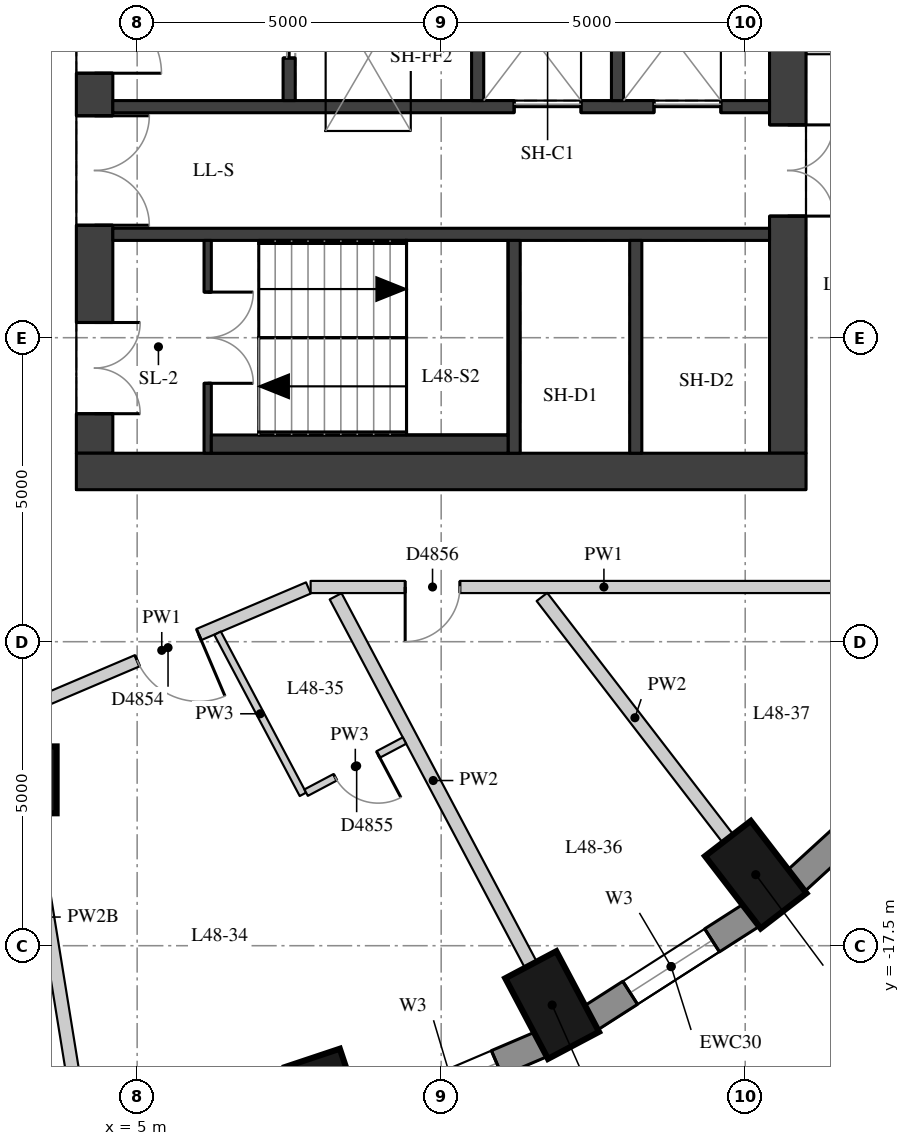
"""IFC4 building model, lengths in metres.
Left out: names, types, materials, properties, quantities, classifications, styles, units other than length and angle.
Written with IfcOpenShell. Run it as: python <this file> out.ifc"""

import sys

from ifc_helpers import new_model, si_unit, direction, frame, frame_2d, origin, origin_2d, place, context, subcontext, project, spatial, rectangle, extrude, element, fill, save


model = new_model("IFC4")
c1 = context("Model", 3, precision=1e-05, world=origin(), true_north=direction((0.0, 1.0)))
c2 = subcontext(c1, "Body", "Model", "MODEL_VIEW")
j1 = project(units=[si_unit("LENGTHUNIT", "METRE"), si_unit("PLANEANGLEUNIT", "RADIAN")], contexts=[c1])
p1 = place(None, origin())
s1 = spatial("IfcSite", under=j1, at=p1, CompositionType="ELEMENT")
p2 = place(p1, origin())
s2 = spatial("IfcBuilding", under=s1, at=p2, CompositionType="ELEMENT")
p3 = place(p2, frame((0.0, 0.0, 171.5)))
s3 = spatial("IfcBuildingStorey", under=s2, at=p3, CompositionType="ELEMENT", Elevation=171.5)
for number, where, z_axis, x_axis in (
    (1, (8.12, -20.056, 0.0), (0.0, 0.0, 1.0), (0.317, -0.949, 0.0)),
    (2, (11.825, -18.476, 0.0), (0.0, 0.0, 1.0), (0.468, -0.884, 0.0)),
    (3, (15.173, -16.332, 0.0), (0.0, 0.0, 1.0), (0.61, -0.792, 0.0)),
):
    element("IfcColumn", number, at=place(p3, frame(where, z_axis=z_axis, x_axis=x_axis)), inside=s3, PredefinedType="COLUMN", context=c2, shape_type="SweptSolid", body=[
        extrude(rectangle(XDim=1.5, YDim=0.95, at=origin_2d()), origin(), (0.0, 0.0, 1.0), 3.3),
    ])
p4 = place(p3, frame((3.126, -14.772, 0.0), z_axis=(0.0, 0.0, 1.0), x_axis=(1.0, 0.0, 0.0)))
e4 = element("IfcColumn", 4, at=p4, inside=s3, PredefinedType="COLUMN", context=c2, shape_type="SweptSolid", body=[
    extrude(rectangle(XDim=1.1, YDim=1.1, at=origin_2d()), origin(), (0.0, 0.0, 1.0), 3.3),
])
p5 = place(p3, frame((8.706, -20.375, 0.0), z_axis=(0.0, 0.0, 1.0), x_axis=(0.91981046949, 0.392362969986, 0.0)))
e5 = element("IfcWall", 5, at=p5, inside=s3, PredefinedType="SOLIDWALL", context=c2, shape_type="SweptSolid", body=[
    extrude(rectangle(XDim=3.201, YDim=0.45, at=frame_2d((1.6, 0.0))), origin(), (0.0, 0.0, 1.0), 3.02),
])
p6 = place(p5, frame((0.8, 0.0, 0.4)))
e6 = element("IfcOpeningElement", 6, at=p6, cuts=e5, PredefinedType="OPENING", context=c2, shape_type="SweptSolid", body=[
    extrude(rectangle(XDim=1.6, YDim=1.75, at=frame_2d((0.8, 0.875))), frame((0.0, 0.235, 0.0), z_axis=(0.0, -1.0, 0.0), x_axis=(1.0, 0.0, 0.0)), (0.0, 0.0, 1.0), 0.47),
])
p7 = place(p3, frame((12.455, -18.693, 0.0), z_axis=(0.0, 0.0, 1.0), x_axis=(0.842065914439, 0.539374633943, 0.0)))
e7 = element("IfcWall", 7, at=p7, inside=s3, PredefinedType="SOLIDWALL", context=c2, shape_type="SweptSolid", body=[
    extrude(rectangle(XDim=3.151, YDim=0.45, at=frame_2d((1.576, 0.0))), origin(), (0.0, 0.0, 1.0), 3.02),
])
p8 = place(p7, frame((0.776, 0.0, 0.4)))
e8 = element("IfcOpeningElement", 8, at=p8, cuts=e7, PredefinedType="OPENING", context=c2, shape_type="SweptSolid", body=[
    extrude(rectangle(XDim=1.6, YDim=1.75, at=frame_2d((0.8, 0.875))), frame((0.0, 0.235, 0.0), z_axis=(0.0, -1.0, 0.0), x_axis=(1.0, 0.0, 0.0)), (0.0, 0.0, 1.0), 0.47),
])
p9 = place(p3, frame((15.83, -16.439, 0.0), z_axis=(0.0, 0.0, 1.0), x_axis=(0.737808755941, 0.675009807082, 0.0)))
e9 = element("IfcWall", 9, at=p9, inside=s3, PredefinedType="SOLIDWALL", context=c2, shape_type="SweptSolid", body=[
    extrude(rectangle(XDim=3.094, YDim=0.45, at=frame_2d((1.547, 0.0))), origin(), (0.0, 0.0, 1.0), 3.02),
])
p10 = place(p3, frame((4.3, -9.4, 0.0), z_axis=(0.0, 0.0, 1.0), x_axis=(0.0, 1.0, 0.0)))
e10 = element("IfcWall", 10, at=p10, inside=s3, PredefinedType="SHEAR", context=c2, shape_type="SweptSolid", body=[
    extrude(rectangle(XDim=18.8, YDim=0.6, at=frame_2d((9.4, 0.0))), origin(), (0.0, 0.0, 1.0), 3.02),
])
p11 = place(p10, frame((0.65, 0.0, 0.0)))
e11 = element("IfcOpeningElement", 11, at=p11, cuts=e10, PredefinedType="OPENING", context=c2, shape_type="SweptSolid", body=[
    extrude(rectangle(XDim=1.5, YDim=2.1, at=frame_2d((0.75, 1.05))), frame((0.0, 0.31, 0.0), z_axis=(0.0, -1.0, 0.0), x_axis=(1.0, 0.0, 0.0)), (0.0, 0.0, 1.0), 0.62),
])
p12 = place(p10, frame((3.75, 0.0, 0.0)))
e12 = element("IfcOpeningElement", 12, at=p12, cuts=e10, PredefinedType="OPENING", context=c2, shape_type="SweptSolid", body=[
    extrude(rectangle(XDim=1.8, YDim=2.1, at=frame_2d((0.9, 1.05))), frame((0.0, 0.31, 0.0), z_axis=(0.0, -1.0, 0.0), x_axis=(1.0, 0.0, 0.0)), (0.0, 0.0, 1.0), 0.62),
])
p13 = place(p10, frame((6.25, 0.0, 0.0)))
e13 = element("IfcOpeningElement", 13, at=p13, cuts=e10, PredefinedType="OPENING", context=c2, shape_type="SweptSolid", body=[
    extrude(rectangle(XDim=1.1, YDim=2.1, at=frame_2d((0.55, 1.05))), frame((0.0, 0.31, 0.0), z_axis=(0.0, -1.0, 0.0), x_axis=(1.0, 0.0, 0.0)), (0.0, 0.0, 1.0), 0.62),
])
p14 = place(p10, frame((8.9, 0.0, 0.0)))
e14 = element("IfcOpeningElement", 14, at=p14, cuts=e10, PredefinedType="OPENING", context=c2, shape_type="SweptSolid", body=[
    extrude(rectangle(XDim=1.0, YDim=2.1, at=frame_2d((0.5, 1.05))), frame((0.0, 0.31, 0.0), z_axis=(0.0, -1.0, 0.0), x_axis=(1.0, 0.0, 0.0)), (0.0, 0.0, 1.0), 0.62),
])
p15 = place(p10, frame((11.45, 0.0, 0.0)))
e15 = element("IfcOpeningElement", 15, at=p15, cuts=e10, PredefinedType="OPENING", context=c2, shape_type="SweptSolid", body=[
    extrude(rectangle(XDim=1.1, YDim=2.1, at=frame_2d((0.55, 1.05))), frame((0.0, 0.31, 0.0), z_axis=(0.0, -1.0, 0.0), x_axis=(1.0, 0.0, 0.0)), (0.0, 0.0, 1.0), 0.62),
])
p16 = place(p10, frame((13.25, 0.0, 0.0)))
e16 = element("IfcOpeningElement", 16, at=p16, cuts=e10, PredefinedType="OPENING", context=c2, shape_type="SweptSolid", body=[
    extrude(rectangle(XDim=1.8, YDim=2.1, at=frame_2d((0.9, 1.05))), frame((0.0, 0.31, 0.0), z_axis=(0.0, -1.0, 0.0), x_axis=(1.0, 0.0, 0.0)), (0.0, 0.0, 1.0), 0.62),
])
p17 = place(p10, frame((16.65, 0.0, 0.0)))
e17 = element("IfcOpeningElement", 17, at=p17, cuts=e10, PredefinedType="OPENING", context=c2, shape_type="SweptSolid", body=[
    extrude(rectangle(XDim=1.5, YDim=2.1, at=frame_2d((0.75, 1.05))), frame((0.0, 0.31, 0.0), z_axis=(0.0, -1.0, 0.0), x_axis=(1.0, 0.0, 0.0)), (0.0, 0.0, 1.0), 0.62),
])
p18 = place(p3, frame((15.7, -9.4, 0.0), z_axis=(0.0, 0.0, 1.0), x_axis=(0.0, 1.0, 0.0)))
e18 = element("IfcWall", 18, at=p18, inside=s3, PredefinedType="SHEAR", context=c2, shape_type="SweptSolid", body=[
    extrude(rectangle(XDim=18.8, YDim=0.6, at=frame_2d((9.4, 0.0))), origin(), (0.0, 0.0, 1.0), 3.02),
])
p19 = place(p18, frame((13.4, 0.0, 0.0)))
e19 = element("IfcOpeningElement", 19, at=p19, cuts=e18, PredefinedType="OPENING", context=c2, shape_type="SweptSolid", body=[
    extrude(rectangle(XDim=1.5, YDim=2.1, at=frame_2d((0.75, 1.05))), frame((0.0, 0.31, 0.0), z_axis=(0.0, -1.0, 0.0), x_axis=(1.0, 0.0, 0.0)), (0.0, 0.0, 1.0), 0.62),
])
p20 = place(p18, frame((3.9, 0.0, 0.0)))
e20 = element("IfcOpeningElement", 20, at=p20, cuts=e18, PredefinedType="OPENING", context=c2, shape_type="SweptSolid", body=[
    extrude(rectangle(XDim=1.5, YDim=2.1, at=frame_2d((0.75, 1.05))), frame((0.0, 0.31, 0.0), z_axis=(0.0, -1.0, 0.0), x_axis=(1.0, 0.0, 0.0)), (0.0, 0.0, 1.0), 0.62),
])
p21 = place(p3, frame((4.0, -9.7, 0.0), z_axis=(0.0, 0.0, 1.0), x_axis=(1.0, 0.0, 0.0)))
e21 = element("IfcWall", 21, at=p21, inside=s3, PredefinedType="SHEAR", context=c2, shape_type="SweptSolid", body=[
    extrude(rectangle(XDim=12.0, YDim=0.6, at=frame_2d((6.0, 0.0))), origin(), (0.0, 0.0, 1.0), 3.02),
])
p22 = place(p3, frame((4.6, -3.7, 0.0), z_axis=(0.0, 0.0, 1.0), x_axis=(1.0, 0.0, 0.0)))
e22 = element("IfcWall", 22, at=p22, inside=s3, PredefinedType="SHEAR", context=c2, shape_type="SweptSolid", body=[
    extrude(rectangle(XDim=10.8, YDim=0.2, at=frame_2d((5.4, 0.0))), origin(), (0.0, 0.0, 1.0), 3.02),
])
p23 = place(p22, frame((6.6, 0.0, 0.0)))
e23 = element("IfcOpeningElement", 23, at=p23, cuts=e22, PredefinedType="OPENING", context=c2, shape_type="SweptSolid", body=[
    extrude(rectangle(XDim=1.1, YDim=2.1, at=frame_2d((0.55, 1.05))), frame((0.0, 0.11, 0.0), z_axis=(0.0, -1.0, 0.0), x_axis=(1.0, 0.0, 0.0)), (0.0, 0.0, 1.0), 0.22),
])
p24 = place(p22, frame((8.9, 0.0, 0.0)))
e24 = element("IfcOpeningElement", 24, at=p24, cuts=e22, PredefinedType="OPENING", context=c2, shape_type="SweptSolid", body=[
    extrude(rectangle(XDim=1.1, YDim=2.1, at=frame_2d((0.55, 1.05))), frame((0.0, 0.11, 0.0), z_axis=(0.0, -1.0, 0.0), x_axis=(1.0, 0.0, 0.0)), (0.0, 0.0, 1.0), 0.22),
])
p25 = place(p3, frame((4.6, -5.8, 0.0), z_axis=(0.0, 0.0, 1.0), x_axis=(1.0, 0.0, 0.0)))
e25 = element("IfcWall", 25, at=p25, inside=s3, PredefinedType="SHEAR", context=c2, shape_type="SweptSolid", body=[
    extrude(rectangle(XDim=10.8, YDim=0.2, at=frame_2d((5.4, 0.0))), origin(), (0.0, 0.0, 1.0), 3.02),
])
for number, where, z_axis, x_axis in (
    (26, (11.2, -9.4, 0.0), (0.0, 0.0, 1.0), (0.0, 1.0, 0.0)),
    (27, (13.2, -9.4, 0.0), (0.0, 0.0, 1.0), (0.0, 1.0, 0.0)),
):
    element("IfcWall", number, at=place(p3, frame(where, z_axis=z_axis, x_axis=x_axis)), inside=s3, PredefinedType="SHEAR", context=c2, shape_type="SweptSolid", body=[
        extrude(rectangle(XDim=3.5, YDim=0.2, at=frame_2d((1.75, 0.0))), origin(), (0.0, 0.0, 1.0), 3.02),
    ])
p26 = place(p3, frame((7.5, -3.6, 0.0), z_axis=(0.0, 0.0, 1.0), x_axis=(0.0, 1.0, 0.0)))
e28 = element("IfcWall", 28, at=p26, inside=s3, PredefinedType="SHEAR", context=c2, shape_type="SweptSolid", body=[
    extrude(rectangle(XDim=2.5, YDim=0.2, at=frame_2d((1.25, 0.0))), origin(), (0.0, 0.0, 1.0), 3.02),
])
p27 = place(p26, frame((0.7, 0.0, 0.0)))
e29 = element("IfcOpeningElement", 29, at=p27, cuts=e28, PredefinedType="OPENING", context=c2, shape_type="SweptSolid", body=[
    extrude(rectangle(XDim=1.1, YDim=2.1, at=frame_2d((0.55, 1.05))), frame((0.0, 0.11, 0.0), z_axis=(0.0, -1.0, 0.0), x_axis=(1.0, 0.0, 0.0)), (0.0, 0.0, 1.0), 0.22),
])
for number, where, z_axis, x_axis in (
    (30, (10.6, -3.6, 0.0), (0.0, 0.0, 1.0), (0.0, 1.0, 0.0)),
    (31, (12.9, -3.6, 0.0), (0.0, 0.0, 1.0), (0.0, 1.0, 0.0)),
):
    element("IfcWall", number, at=place(p3, frame(where, z_axis=z_axis, x_axis=x_axis)), inside=s3, PredefinedType="SHEAR", context=c2, shape_type="SweptSolid", body=[
        extrude(rectangle(XDim=2.5, YDim=0.2, at=frame_2d((1.25, 0.0))), origin(), (0.0, 0.0, 1.0), 3.02),
    ])
p28 = place(p3, frame((6.16, -9.4, 0.0), z_axis=(0.0, 0.0, 1.0), x_axis=(0.0, 1.0, 0.0)))
e32 = element("IfcWall", 32, at=p28, inside=s3, PredefinedType="SHEAR", context=c2, shape_type="SweptSolid", body=[
    extrude(rectangle(XDim=3.5, YDim=0.12, at=frame_2d((1.75, 0.0))), origin(), (0.0, 0.0, 1.0), 3.02),
])
p29 = place(p28, frame((1.15, 0.0, 0.0)))
e33 = element("IfcOpeningElement", 33, at=p29, cuts=e32, PredefinedType="OPENING", context=c2, shape_type="SweptSolid", body=[
    extrude(rectangle(XDim=1.5, YDim=2.1, at=frame_2d((0.75, 1.05))), frame((0.0, 0.07, 0.0), z_axis=(0.0, -1.0, 0.0), x_axis=(1.0, 0.0, 0.0)), (0.0, 0.0, 1.0), 0.14),
])
p30 = place(p3, frame((6.22, -9.25, 0.0), z_axis=(0.0, 0.0, 1.0), x_axis=(1.0, 0.0, 0.0)))
e34 = element("IfcWall", 34, at=p30, inside=s3, PredefinedType="PARTITIONING", context=c2, shape_type="SweptSolid", body=[
    extrude(rectangle(XDim=4.88, YDim=0.3, at=frame_2d((2.44, 0.0))), origin(), (0.0, 0.0, 1.0), 3.02),
])
p31 = place(p3, frame((16.004, -2.738, 0.0), z_axis=(0.0, 0.0, 1.0), x_axis=(1.0, 0.0, 0.0)))
e35 = element("IfcWall", 35, at=p31, inside=s3, PredefinedType="PARTITIONING", context=c2, shape_type="SweptSolid", body=[
    extrude(rectangle(XDim=1.596, YDim=0.2, at=frame_2d((0.798, 0.0))), origin(), (0.0, 0.0, 1.0), 3.02),
])
p32 = place(p3, frame((17.5, -11.6, 0.0), z_axis=(0.0, 0.0, 1.0), x_axis=(-1.0, 0.0, 0.0)))
e36 = element("IfcWall", 36, at=p32, inside=s3, PredefinedType="PARTITIONING", context=c2, shape_type="SweptSolid", body=[
    extrude(rectangle(XDim=9.647, YDim=0.2, at=frame_2d((4.823, 0.0))), origin(), (0.0, 0.0, 1.0), 3.02),
])
p33 = place(p32, frame((7.192, 0.0, 0.0)))
e37 = element("IfcOpeningElement", 37, at=p33, cuts=e36, PredefinedType="OPENING", context=c2, shape_type="SweptSolid", body=[
    extrude(rectangle(XDim=0.9, YDim=2.1, at=frame_2d((0.45, 1.05))), frame((0.0, 0.11, 0.0), z_axis=(0.0, -1.0, 0.0), x_axis=(1.0, 0.0, 0.0)), (0.0, 0.0, 1.0), 0.22),
])
p34 = place(p3, frame((7.816, -11.616, 0.0), z_axis=(0.0, 0.0, 1.0), x_axis=(-0.92017534212, -0.391506500271, 0.0)))
e38 = element("IfcWall", 38, at=p34, inside=s3, PredefinedType="PARTITIONING", context=c2, shape_type="SweptSolid", body=[
    extrude(rectangle(XDim=5.242, YDim=0.2, at=frame_2d((2.621, 0.0))), origin(), (0.0, 0.0, 1.0), 3.02),
])
p35 = place(p34, frame((1.959, 0.0, 0.0)))
e39 = element("IfcOpeningElement", 39, at=p35, cuts=e38, PredefinedType="OPENING", context=c2, shape_type="SweptSolid", body=[
    extrude(rectangle(XDim=1.1, YDim=2.1, at=frame_2d((0.55, 1.05))), frame((0.0, 0.11, 0.0), z_axis=(0.0, -1.0, 0.0), x_axis=(1.0, 0.0, 0.0)), (0.0, 0.0, 1.0), 0.22),
])
p36 = place(p3, frame((4.052, -20.284, 0.0), z_axis=(0.0, 0.0, 1.0), x_axis=(-0.159678232595, 0.987169115215, 0.0)))
e40 = element("IfcWall", 40, at=p36, inside=s3, PredefinedType="PARTITIONING", context=c2, shape_type="SweptSolid", body=[
    extrude(rectangle(XDim=6.594, YDim=0.22, at=frame_2d((3.297, 0.0))), origin(), (0.0, 0.0, 1.0), 2.57),
])
p37 = place(p3, frame((11.474, -17.813, 0.0), z_axis=(0.0, 0.0, 1.0), x_axis=(-0.468051273849, 0.88370130986, 0.0)))
e41 = element("IfcWall", 41, at=p37, inside=s3, PredefinedType="PARTITIONING", context=c2, shape_type="SweptSolid", body=[
    extrude(rectangle(XDim=6.858, YDim=0.22, at=frame_2d((3.429, 0.0))), origin(), (0.0, 0.0, 1.0), 3.02),
])
p38 = place(p3, frame((14.716, -15.737, 0.0), z_axis=(0.0, 0.0, 1.0), x_axis=(-0.609986007715, 0.792412184657, 0.0)))
e42 = element("IfcWall", 42, at=p38, inside=s3, PredefinedType="PARTITIONING", context=c2, shape_type="SweptSolid", body=[
    extrude(rectangle(XDim=5.015, YDim=0.22, at=frame_2d((2.507, 0.0))), origin(), (0.0, 0.0, 1.0), 3.02),
])
p39 = place(p3, frame((6.323, -12.36, 0.0), z_axis=(0.0, 0.0, 1.0), x_axis=(0.468059755139, -0.883696817703, 0.0)))
e43 = element("IfcWall", 43, at=p39, inside=s3, PredefinedType="PARTITIONING", context=c2, shape_type="SweptSolid", body=[
    extrude(rectangle(XDim=2.999, YDim=0.12, at=frame_2d((1.5, 0.0))), origin(), (0.0, 0.0, 1.0), 3.02),
])
p40 = place(p3, frame((7.779, -14.983, 0.0), z_axis=(0.0, 0.0, 1.0), x_axis=(0.883697051485, 0.46805931376, 0.0)))
e44 = element("IfcWall", 44, at=p40, inside=s3, PredefinedType="PARTITIONING", context=c2, shape_type="SweptSolid", body=[
    extrude(rectangle(XDim=1.83, YDim=0.12, at=frame_2d((0.915, 0.0))), origin(), (0.0, 0.0, 1.0), 3.02),
])
p41 = place(p40, frame((0.54, 0.0, 0.0)))
e45 = element("IfcOpeningElement", 45, at=p41, cuts=e44, PredefinedType="OPENING", context=c2, shape_type="SweptSolid", body=[
    extrude(rectangle(XDim=0.8, YDim=2.1, at=frame_2d((0.4, 1.05))), frame((0.0, 0.07, 0.0), z_axis=(0.0, -1.0, 0.0), x_axis=(1.0, 0.0, 0.0)), (0.0, 0.0, 1.0), 0.14),
])
p42 = place(p6, origin())
e46 = element("IfcWindow", 46, at=p42, inside=s3, PartitioningType="SINGLE_PANEL", PredefinedType="WINDOW", context=c2, shape_type="SweptSolid", body=[
    extrude(rectangle(XDim=1.6, YDim=1.75, at=frame_2d((0.8, 0.875))), frame((0.0, 0.035, 0.0), z_axis=(0.0, -1.0, 0.0), x_axis=(1.0, 0.0, 0.0)), (0.0, 0.0, 1.0), 0.06),
])
fill(e6, e46)
p43 = place(p8, origin())
e47 = element("IfcWindow", 47, at=p43, inside=s3, PartitioningType="SINGLE_PANEL", PredefinedType="WINDOW", context=c2, shape_type="SweptSolid", body=[
    extrude(rectangle(XDim=1.6, YDim=1.75, at=frame_2d((0.8, 0.875))), frame((0.0, 0.035, 0.0), z_axis=(0.0, -1.0, 0.0), x_axis=(1.0, 0.0, 0.0)), (0.0, 0.0, 1.0), 0.06),
])
fill(e8, e47)
p44 = place(p11, origin())
e48 = element("IfcDoor", 48, at=p44, inside=s3, OperationType="DOUBLE_DOOR_SINGLE_SWING", PredefinedType="DOOR", context=c2, shape_type="SweptSolid", body=[
    extrude(rectangle(XDim=1.5, YDim=2.1, at=frame_2d((0.75, 1.05))), frame((0.0, 0.025, 0.0), z_axis=(0.0, -1.0, 0.0), x_axis=(1.0, 0.0, 0.0)), (0.0, 0.0, 1.0), 0.05),
])
fill(e11, e48)
p45 = place(p12, origin())
e49 = element("IfcDoor", 49, at=p45, inside=s3, OperationType="DOUBLE_DOOR_SINGLE_SWING", PredefinedType="DOOR", context=c2, shape_type="SweptSolid", body=[
    extrude(rectangle(XDim=1.8, YDim=2.1, at=frame_2d((0.9, 1.05))), frame((0.0, 0.025, 0.0), z_axis=(0.0, -1.0, 0.0), x_axis=(1.0, 0.0, 0.0)), (0.0, 0.0, 1.0), 0.05),
])
fill(e12, e49)
p46 = place(p13, origin())
e50 = element("IfcDoor", 50, at=p46, inside=s3, OperationType="SINGLE_SWING_RIGHT", PredefinedType="DOOR", context=c2, shape_type="SweptSolid", body=[
    extrude(rectangle(XDim=1.1, YDim=2.1, at=frame_2d((0.55, 1.05))), frame((0.0, 0.025, 0.0), z_axis=(0.0, -1.0, 0.0), x_axis=(1.0, 0.0, 0.0)), (0.0, 0.0, 1.0), 0.05),
])
fill(e13, e50)
p47 = place(p20, origin())
e51 = element("IfcDoor", 51, at=p47, inside=s3, OperationType="DOUBLE_DOOR_SINGLE_SWING", PredefinedType="DOOR", context=c2, shape_type="SweptSolid", body=[
    extrude(rectangle(XDim=1.5, YDim=2.1, at=frame_2d((0.75, 1.05))), frame((0.0, 0.025, 0.0), z_axis=(0.0, -1.0, 0.0), x_axis=(1.0, 0.0, 0.0)), (0.0, 0.0, 1.0), 0.05),
])
fill(e20, e51)
p48 = place(p29, origin())
e52 = element("IfcDoor", 52, at=p48, inside=s3, OperationType="DOUBLE_DOOR_SINGLE_SWING", PredefinedType="DOOR", context=c2, shape_type="SweptSolid", body=[
    extrude(rectangle(XDim=1.5, YDim=2.1, at=frame_2d((0.75, 1.05))), frame((0.0, 0.025, 0.0), z_axis=(0.0, -1.0, 0.0), x_axis=(1.0, 0.0, 0.0)), (0.0, 0.0, 1.0), 0.05),
])
fill(e33, e52)
p49 = place(p23, origin())
e53 = element("IfcDoor", 53, at=p49, inside=s3, OperationType="DOUBLE_DOOR_SLIDING", PredefinedType="DOOR", context=c2, shape_type="SweptSolid", body=[
    extrude(rectangle(XDim=1.1, YDim=2.1, at=frame_2d((0.55, 1.05))), frame((0.0, 0.025, 0.0), z_axis=(0.0, -1.0, 0.0), x_axis=(1.0, 0.0, 0.0)), (0.0, 0.0, 1.0), 0.05),
])
fill(e23, e53)
p50 = place(p24, origin())
e54 = element("IfcDoor", 54, at=p50, inside=s3, OperationType="DOUBLE_DOOR_SLIDING", PredefinedType="DOOR", context=c2, shape_type="SweptSolid", body=[
    extrude(rectangle(XDim=1.1, YDim=2.1, at=frame_2d((0.55, 1.05))), frame((0.0, 0.025, 0.0), z_axis=(0.0, -1.0, 0.0), x_axis=(1.0, 0.0, 0.0)), (0.0, 0.0, 1.0), 0.05),
])
fill(e24, e54)
p51 = place(p27, origin())
e55 = element("IfcDoor", 55, at=p51, inside=s3, OperationType="DOUBLE_DOOR_SLIDING", PredefinedType="DOOR", context=c2, shape_type="SweptSolid", body=[
    extrude(rectangle(XDim=1.1, YDim=2.1, at=frame_2d((0.55, 1.05))), frame((0.0, 0.025, 0.0), z_axis=(0.0, -1.0, 0.0), x_axis=(1.0, 0.0, 0.0)), (0.0, 0.0, 1.0), 0.05),
])
fill(e29, e55)
p52 = place(p35, origin())
e56 = element("IfcDoor", 56, at=p52, inside=s3, OperationType="SINGLE_SWING_LEFT", PredefinedType="DOOR", context=c2, shape_type="SweptSolid", body=[
    extrude(rectangle(XDim=1.1, YDim=2.1, at=frame_2d((0.55, 1.05))), frame((0.0, 0.025, 0.0), z_axis=(0.0, -1.0, 0.0), x_axis=(1.0, 0.0, 0.0)), (0.0, 0.0, 1.0), 0.05),
])
fill(e39, e56)
p53 = place(p41, origin())
e57 = element("IfcDoor", 57, at=p53, inside=s3, OperationType="SINGLE_SWING_LEFT", PredefinedType="DOOR", context=c2, shape_type="SweptSolid", body=[
    extrude(rectangle(XDim=0.8, YDim=2.1, at=frame_2d((0.4, 1.05))), frame((0.0, 0.025, 0.0), z_axis=(0.0, -1.0, 0.0), x_axis=(1.0, 0.0, 0.0)), (0.0, 0.0, 1.0), 0.05),
])
fill(e45, e57)
p54 = place(p33, origin())
e58 = element("IfcDoor", 58, at=p54, inside=s3, OperationType="SINGLE_SWING_RIGHT", PredefinedType="DOOR", context=c2, shape_type="SweptSolid", body=[
    extrude(rectangle(XDim=0.9, YDim=2.1, at=frame_2d((0.45, 1.05))), frame((0.0, 0.025, 0.0), z_axis=(0.0, -1.0, 0.0), x_axis=(1.0, 0.0, 0.0)), (0.0, 0.0, 1.0), 0.05),
])
fill(e37, e58)
save(model, sys.argv[1])
